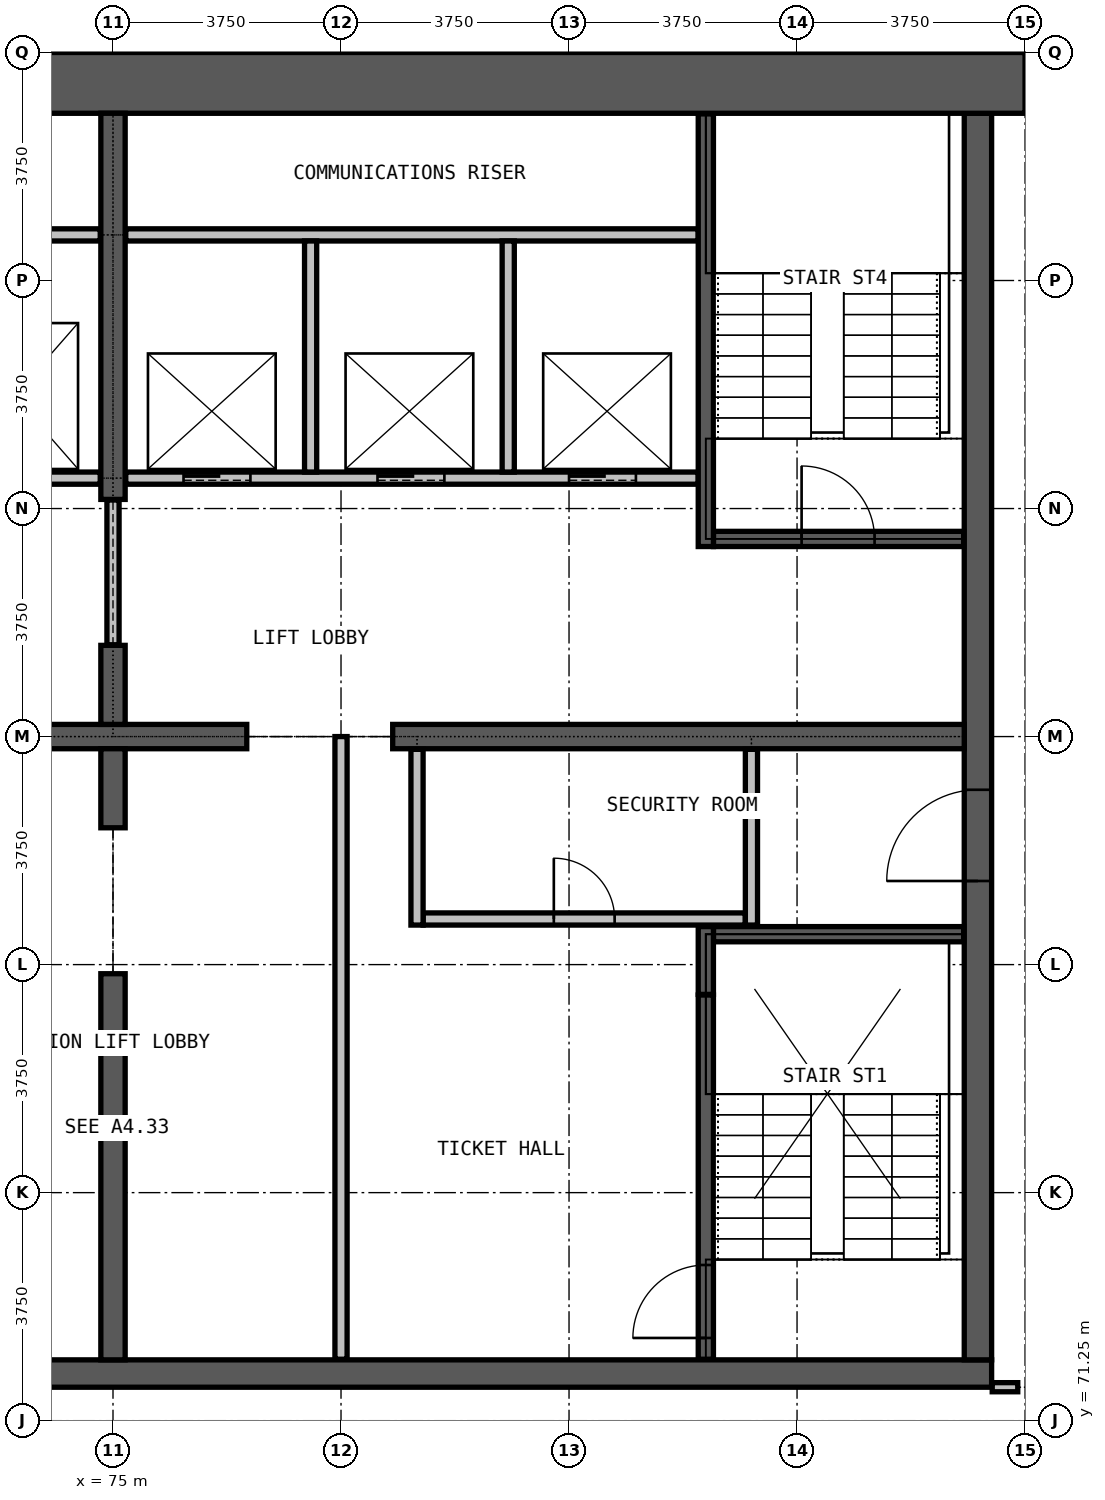
"""IFC4 building model, lengths in metres.
Left out: names, types, materials, properties, quantities, classifications, styles, units other than length and angle.
Written with IfcOpenShell. Run it as: python <this file> out.ifc"""

import sys

from ifc_helpers import new_model, si_unit, direction, frame, frame_2d, origin, place, context, subcontext, project, spatial, rectangle, extrude, element, fill, save


model = new_model("IFC4")
c1 = context("Model", 3, precision=1e-05, world=origin(), true_north=direction((0.0, 1.0)))
c2 = subcontext(c1, "Body", "Model", "MODEL_VIEW")
j1 = project(units=[si_unit("LENGTHUNIT", "METRE"), si_unit("PLANEANGLEUNIT", "RADIAN")], contexts=[c1])
p1 = place(None, origin())
s1 = spatial("IfcSite", under=j1, at=p1, CompositionType="ELEMENT")
p2 = place(p1, origin())
s2 = spatial("IfcBuilding", under=s1, at=p2, CompositionType="ELEMENT")
p3 = place(p2, frame((0.0, 0.0, 287.7)))
s3 = spatial("IfcBuildingStorey", under=s2, at=p3, CompositionType="ELEMENT", Elevation=287.7)
p4 = place(p3, frame((60.55, 72.025, 0.0), z_axis=(0.0, 0.0, 1.0), x_axis=(1.0, 0.0, 0.0)))
e1 = element("IfcWall", 1, at=p4, inside=s3, PredefinedType="SHEAR", context=c2, shape_type="SweptSolid", body=[
    extrude(rectangle(XDim=28.9, YDim=0.45, at=frame_2d((14.45, 0.0))), origin(), (0.0, 0.0, 1.0), 5.0),
])
p5 = place(p4, frame((10.325, 0.0, 0.0)))
e2 = element("IfcOpeningElement", 2, at=p5, cuts=e1, PredefinedType="OPENING", context=c2, shape_type="SweptSolid", body=[
    extrude(rectangle(XDim=1.5, YDim=2.2, at=frame_2d((0.75, 1.1))), frame((0.0, 0.235, 0.0), z_axis=(0.0, -1.0, 0.0), x_axis=(1.0, 0.0, 0.0)), (0.0, 0.0, 1.0), 0.47),
])
p6 = place(p3, frame((89.225, 72.25, 0.0), z_axis=(0.0, 0.0, 1.0), x_axis=(0.0, 1.0, 0.0)))
e3 = element("IfcWall", 3, at=p6, inside=s3, PredefinedType="SHEAR", context=c2, shape_type="SweptSolid", body=[
    extrude(rectangle(XDim=20.5, YDim=0.45, at=frame_2d((10.25, 0.0))), origin(), (0.0, 0.0, 1.0), 5.0),
])
p7 = place(p6, frame((7.875, 0.0, 0.0)))
e4 = element("IfcOpeningElement", 4, at=p7, cuts=e3, PredefinedType="OPENING", context=c2, shape_type="SweptSolid", body=[
    extrude(rectangle(XDim=1.5, YDim=2.2, at=frame_2d((0.75, 1.1))), frame((0.0, 0.235, 0.0), z_axis=(0.0, -1.0, 0.0), x_axis=(1.0, 0.0, 0.0)), (0.0, 0.0, 1.0), 0.47),
])
p8 = place(p3, frame((90.0, 93.25, 0.0), z_axis=(0.0, 0.0, 1.0), x_axis=(-1.0, 0.0, 0.0)))
e5 = element("IfcWall", 5, at=p8, inside=s3, PredefinedType="SHEAR", context=c2, shape_type="SweptSolid", body=[
    extrude(rectangle(XDim=30.0, YDim=1.0, at=frame_2d((15.0, 0.0))), origin(), (0.0, 0.0, 1.0), 5.0),
])
p9 = place(p3, frame((72.8, 82.5, 0.0), z_axis=(0.0, 0.0, 1.0), x_axis=(1.0, 0.0, 0.0)))
e6 = element("IfcWall", 6, at=p9, inside=s3, PredefinedType="SHEAR", context=c2, shape_type="SweptSolid", body=[
    extrude(rectangle(XDim=4.4, YDim=0.4, at=frame_2d((2.2, 0.0))), origin(), (0.0, 0.0, 1.0), 5.0),
])
p10 = place(p3, frame((79.6, 82.5, 0.0), z_axis=(0.0, 0.0, 1.0), x_axis=(1.0, 0.0, 0.0)))
e7 = element("IfcWall", 7, at=p10, inside=s3, PredefinedType="SHEAR", context=c2, shape_type="SweptSolid", body=[
    extrude(rectangle(XDim=9.4, YDim=0.4, at=frame_2d((4.7, 0.0))), origin(), (0.0, 0.0, 1.0), 5.0),
])
p11 = place(p3, frame((75.0, 72.25, 0.0), z_axis=(0.0, 0.0, 1.0), x_axis=(0.0, 1.0, 0.0)))
e8 = element("IfcWall", 8, at=p11, inside=s3, PredefinedType="SHEAR", context=c2, shape_type="SweptSolid", body=[
    extrude(rectangle(XDim=6.35, YDim=0.4, at=frame_2d((3.175, 0.0))), origin(), (0.0, 0.0, 1.0), 5.0),
])
for number, where, z_axis, x_axis in (
    (9, (75.0, 81.0, 0.0), (0.0, 0.0, 1.0), (0.0, 1.0, 0.0)),
    (10, (75.0, 82.7, 0.0), (0.0, 0.0, 1.0), (0.0, 1.0, 0.0)),
):
    element("IfcWall", number, at=place(p3, frame(where, z_axis=z_axis, x_axis=x_axis)), inside=s3, PredefinedType="SHEAR", context=c2, shape_type="SweptSolid", body=[
        extrude(rectangle(XDim=1.3, YDim=0.4, at=frame_2d((0.65, 0.0))), origin(), (0.0, 0.0, 1.0), 5.0),
    ])
p12 = place(p3, frame((75.0, 86.4, 0.0), z_axis=(0.0, 0.0, 1.0), x_axis=(0.0, 1.0, 0.0)))
e11 = element("IfcWall", 11, at=p12, inside=s3, PredefinedType="SHEAR", context=c2, shape_type="SweptSolid", body=[
    extrude(rectangle(XDim=6.35, YDim=0.4, at=frame_2d((3.175, 0.0))), origin(), (0.0, 0.0, 1.0), 5.0),
])
p13 = place(p3, frame((80.1, 79.5, 0.0), z_axis=(0.0, 0.0, 1.0), x_axis=(1.0, 0.0, 0.0)))
e12 = element("IfcWall", 12, at=p13, inside=s3, PredefinedType="PARTITIONING", context=c2, shape_type="SweptSolid", body=[
    extrude(rectangle(XDim=5.3, YDim=0.2, at=frame_2d((2.65, 0.0))), origin(), (0.0, 0.0, 1.0), 4.65),
])
p14 = place(p13, frame((2.15, 0.0, 0.0)))
e13 = element("IfcOpeningElement", 13, at=p14, cuts=e12, PredefinedType="OPENING", context=c2, shape_type="SweptSolid", body=[
    extrude(rectangle(XDim=1.0, YDim=2.2, at=frame_2d((0.5, 1.1))), frame((0.0, 0.11, 0.0), z_axis=(0.0, -1.0, 0.0), x_axis=(1.0, 0.0, 0.0)), (0.0, 0.0, 1.0), 0.22),
])
p15 = place(p3, frame((75.0, 84.01, 0.0), z_axis=(0.0, 0.0, 1.0), x_axis=(0.0, 1.0, 0.0)))
e14 = element("IfcWall", 14, at=p15, inside=s3, PredefinedType="PARTITIONING", context=c2, shape_type="SweptSolid", body=[
    extrude(rectangle(XDim=2.38, YDim=0.2, at=frame_2d((1.19, 0.0))), origin(), (0.0, 0.0, 1.0), 2.4),
])
p16 = place(p3, frame((78.75, 72.26, 0.0), z_axis=(0.0, 0.0, 1.0), x_axis=(0.0, 1.0, 0.0)))
e15 = element("IfcWall", 15, at=p16, inside=s3, PredefinedType="PARTITIONING", context=c2, shape_type="SweptSolid", body=[
    extrude(rectangle(XDim=10.24, YDim=0.2, at=frame_2d((5.12, 0.0))), origin(), (0.0, 0.0, 1.0), 4.65),
])
for number, where, z_axis, x_axis in (
    (16, (80.0, 79.4, 0.0), (0.0, 0.0, 1.0), (0.0, 1.0, 0.0)),
    (17, (85.5, 79.4, 0.0), (0.0, 0.0, 1.0), (0.0, 1.0, 0.0)),
):
    element("IfcWall", number, at=place(p3, frame(where, z_axis=z_axis, x_axis=x_axis)), inside=s3, PredefinedType="PARTITIONING", context=c2, shape_type="SweptSolid", body=[
        extrude(rectangle(XDim=2.89, YDim=0.2, at=frame_2d((1.445, 0.0))), origin(), (0.0, 0.0, 1.0), 4.65),
    ])
p17 = place(p3, frame((89.46, 71.8, 0.0), z_axis=(0.0, 0.0, 1.0), x_axis=(1.0, 0.0, 0.0)))
e18 = element("IfcWall", 18, at=p17, inside=s3, PredefinedType="PARTITIONING", context=c2, shape_type="SweptSolid", body=[
    extrude(rectangle(XDim=0.42, YDim=0.15, at=frame_2d((0.21, 0.0))), origin(), (0.0, 0.0, 1.0), 4.65),
])
p18 = place(p3, frame((65.375, 86.75, 0.0), z_axis=(0.0, 0.0, 1.0), x_axis=(1.0, 0.0, 0.0)))
e19 = element("IfcWall", 19, at=p18, inside=s3, PredefinedType="PARTITIONING", context=c2, shape_type="SweptSolid", body=[
    extrude(rectangle(XDim=9.415, YDim=0.2, at=frame_2d((4.708, 0.0))), origin(), (0.0, 0.0, 1.0), 4.65),
])
p19 = place(p18, frame((1.0, 0.0, 0.0)))
e20 = element("IfcOpeningElement", 20, at=p19, cuts=e19, PredefinedType="OPENING", context=c2, shape_type="SweptSolid", body=[
    extrude(rectangle(XDim=1.1, YDim=2.2, at=frame_2d((0.55, 1.1))), frame((0.0, 0.11, 0.0), z_axis=(0.0, -1.0, 0.0), x_axis=(1.0, 0.0, 0.0)), (0.0, 0.0, 1.0), 0.22),
])
p20 = place(p18, frame((4.175, 0.0, 0.0)))
e21 = element("IfcOpeningElement", 21, at=p20, cuts=e19, PredefinedType="OPENING", context=c2, shape_type="SweptSolid", body=[
    extrude(rectangle(XDim=1.1, YDim=2.2, at=frame_2d((0.55, 1.1))), frame((0.0, 0.11, 0.0), z_axis=(0.0, -1.0, 0.0), x_axis=(1.0, 0.0, 0.0)), (0.0, 0.0, 1.0), 0.22),
])
p21 = place(p18, frame((7.325, 0.0, 0.0)))
e22 = element("IfcOpeningElement", 22, at=p21, cuts=e19, PredefinedType="OPENING", context=c2, shape_type="SweptSolid", body=[
    extrude(rectangle(XDim=1.1, YDim=2.2, at=frame_2d((0.55, 1.1))), frame((0.0, 0.11, 0.0), z_axis=(0.0, -1.0, 0.0), x_axis=(1.0, 0.0, 0.0)), (0.0, 0.0, 1.0), 0.22),
])
p22 = place(p3, frame((75.21, 86.75, 0.0), z_axis=(0.0, 0.0, 1.0), x_axis=(1.0, 0.0, 0.0)))
e23 = element("IfcWall", 23, at=p22, inside=s3, PredefinedType="PARTITIONING", context=c2, shape_type="SweptSolid", body=[
    extrude(rectangle(XDim=9.415, YDim=0.2, at=frame_2d((4.708, 0.0))), origin(), (0.0, 0.0, 1.0), 4.65),
])
p23 = place(p22, frame((0.95, 0.0, 0.0)))
e24 = element("IfcOpeningElement", 24, at=p23, cuts=e23, PredefinedType="OPENING", context=c2, shape_type="SweptSolid", body=[
    extrude(rectangle(XDim=1.1, YDim=2.2, at=frame_2d((0.55, 1.1))), frame((0.0, 0.11, 0.0), z_axis=(0.0, -1.0, 0.0), x_axis=(1.0, 0.0, 0.0)), (0.0, 0.0, 1.0), 0.22),
])
p24 = place(p22, frame((4.14, 0.0, 0.0)))
e25 = element("IfcOpeningElement", 25, at=p24, cuts=e23, PredefinedType="OPENING", context=c2, shape_type="SweptSolid", body=[
    extrude(rectangle(XDim=1.1, YDim=2.2, at=frame_2d((0.55, 1.1))), frame((0.0, 0.11, 0.0), z_axis=(0.0, -1.0, 0.0), x_axis=(1.0, 0.0, 0.0)), (0.0, 0.0, 1.0), 0.22),
])
p25 = place(p22, frame((7.29, 0.0, 0.0)))
e26 = element("IfcOpeningElement", 26, at=p25, cuts=e23, PredefinedType="OPENING", context=c2, shape_type="SweptSolid", body=[
    extrude(rectangle(XDim=1.1, YDim=2.2, at=frame_2d((0.55, 1.1))), frame((0.0, 0.11, 0.0), z_axis=(0.0, -1.0, 0.0), x_axis=(1.0, 0.0, 0.0)), (0.0, 0.0, 1.0), 0.22),
])
for number, where, z_axis, x_axis in (
    (27, (65.375, 90.75, 0.0), (0.0, 0.0, 1.0), (1.0, 0.0, 0.0)),
    (28, (75.21, 90.75, 0.0), (0.0, 0.0, 1.0), (1.0, 0.0, 0.0)),
):
    element("IfcWall", number, at=place(p3, frame(where, z_axis=z_axis, x_axis=x_axis)), inside=s3, PredefinedType="PARTITIONING", context=c2, shape_type="SweptSolid", body=[
        extrude(rectangle(XDim=9.415, YDim=0.2, at=frame_2d((4.708, 0.0))), origin(), (0.0, 0.0, 1.0), 4.65),
    ])
for number, where, z_axis, x_axis in (
    (29, (78.25, 86.85, 0.0), (0.0, 0.0, 1.0), (0.0, 1.0, 0.0)),
    (30, (81.5, 86.85, 0.0), (0.0, 0.0, 1.0), (0.0, 1.0, 0.0)),
):
    element("IfcWall", number, at=place(p3, frame(where, z_axis=z_axis, x_axis=x_axis)), inside=s3, PredefinedType="PARTITIONING", context=c2, shape_type="SweptSolid", body=[
        extrude(rectangle(XDim=3.8, YDim=0.2, at=frame_2d((1.9, 0.0))), origin(), (0.0, 0.0, 1.0), 4.65),
    ])
p26 = place(p3, frame((84.875, 79.25, 0.0), z_axis=(0.0, 0.0, 1.0), x_axis=(1.0, 0.0, 0.0)))
e31 = element("IfcWall", 31, at=p26, inside=s3, PredefinedType="PARTITIONING", context=c2, shape_type="SweptSolid", body=[
    extrude(rectangle(XDim=4.115, YDim=0.25, at=frame_2d((2.058, 0.0))), origin(), (0.0, 0.0, 1.0), 4.65),
])
p27 = place(p3, frame((84.875, 85.75, 0.0), z_axis=(0.0, 0.0, 1.0), x_axis=(1.0, 0.0, 0.0)))
e32 = element("IfcWall", 32, at=p27, inside=s3, PredefinedType="PARTITIONING", context=c2, shape_type="SweptSolid", body=[
    extrude(rectangle(XDim=4.115, YDim=0.25, at=frame_2d((2.058, 0.0))), origin(), (0.0, 0.0, 1.0), 4.65),
])
p28 = place(p27, frame((1.45, 0.0, 0.0)))
e33 = element("IfcOpeningElement", 33, at=p28, cuts=e32, PredefinedType="OPENING", context=c2, shape_type="SweptSolid", body=[
    extrude(rectangle(XDim=1.2, YDim=2.2, at=frame_2d((0.6, 1.1))), frame((0.0, 0.135, 0.0), z_axis=(0.0, -1.0, 0.0), x_axis=(1.0, 0.0, 0.0)), (0.0, 0.0, 1.0), 0.27),
])
p29 = place(p3, frame((84.75, 72.26, 0.0), z_axis=(0.0, 0.0, 1.0), x_axis=(0.0, 1.0, 0.0)))
e34 = element("IfcWall", 34, at=p29, inside=s3, PredefinedType="PARTITIONING", context=c2, shape_type="SweptSolid", body=[
    extrude(rectangle(XDim=5.99, YDim=0.25, at=frame_2d((2.995, 0.0))), origin(), (0.0, 0.0, 1.0), 4.65),
])
p30 = place(p29, frame((0.35, 0.0, 0.0)))
e35 = element("IfcOpeningElement", 35, at=p30, cuts=e34, PredefinedType="OPENING", context=c2, shape_type="SweptSolid", body=[
    extrude(rectangle(XDim=1.2, YDim=2.2, at=frame_2d((0.6, 1.1))), frame((0.0, 0.135, 0.0), z_axis=(0.0, -1.0, 0.0), x_axis=(1.0, 0.0, 0.0)), (0.0, 0.0, 1.0), 0.27),
])
p31 = place(p3, frame((84.75, 78.26, 0.0), z_axis=(0.0, 0.0, 1.0), x_axis=(0.0, 1.0, 0.0)))
e36 = element("IfcWall", 36, at=p31, inside=s3, PredefinedType="PARTITIONING", context=c2, shape_type="SweptSolid", body=[
    extrude(rectangle(XDim=1.115, YDim=0.25, at=frame_2d((0.558, 0.0))), origin(), (0.0, 0.0, 1.0), 4.65),
])
p32 = place(p3, frame((84.75, 85.625, 0.0), z_axis=(0.0, 0.0, 1.0), x_axis=(0.0, 1.0, 0.0)))
e37 = element("IfcWall", 37, at=p32, inside=s3, PredefinedType="PARTITIONING", context=c2, shape_type="SweptSolid", body=[
    extrude(rectangle(XDim=7.115, YDim=0.25, at=frame_2d((3.558, 0.0))), origin(), (0.0, 0.0, 1.0), 4.65),
])
p33 = place(p23, origin())
e38 = element("IfcDoor", 38, at=p33, inside=s3, OperationType="DOUBLE_DOOR_SLIDING", PredefinedType="DOOR", context=c2, shape_type="SweptSolid", body=[
    extrude(rectangle(XDim=1.1, YDim=2.2, at=frame_2d((0.55, 1.1))), frame((0.0, 0.025, 0.0), z_axis=(0.0, -1.0, 0.0), x_axis=(1.0, 0.0, 0.0)), (0.0, 0.0, 1.0), 0.05),
])
fill(e24, e38)
p34 = place(p24, origin())
e39 = element("IfcDoor", 39, at=p34, inside=s3, OperationType="DOUBLE_DOOR_SLIDING", PredefinedType="DOOR", context=c2, shape_type="SweptSolid", body=[
    extrude(rectangle(XDim=1.1, YDim=2.2, at=frame_2d((0.55, 1.1))), frame((0.0, 0.025, 0.0), z_axis=(0.0, -1.0, 0.0), x_axis=(1.0, 0.0, 0.0)), (0.0, 0.0, 1.0), 0.05),
])
fill(e25, e39)
p35 = place(p25, origin())
e40 = element("IfcDoor", 40, at=p35, inside=s3, OperationType="DOUBLE_DOOR_SLIDING", PredefinedType="DOOR", context=c2, shape_type="SweptSolid", body=[
    extrude(rectangle(XDim=1.1, YDim=2.2, at=frame_2d((0.55, 1.1))), frame((0.0, 0.025, 0.0), z_axis=(0.0, -1.0, 0.0), x_axis=(1.0, 0.0, 0.0)), (0.0, 0.0, 1.0), 0.05),
])
fill(e26, e40)
p36 = place(p28, origin())
e41 = element("IfcDoor", 41, at=p36, inside=s3, OperationType="SINGLE_SWING_RIGHT", PredefinedType="DOOR", context=c2, shape_type="SweptSolid", body=[
    extrude(rectangle(XDim=1.2, YDim=2.2, at=frame_2d((0.6, 1.1))), frame((0.0, 0.025, 0.0), z_axis=(0.0, -1.0, 0.0), x_axis=(1.0, 0.0, 0.0)), (0.0, 0.0, 1.0), 0.05),
])
fill(e33, e41)
p37 = place(p30, origin())
e42 = element("IfcDoor", 42, at=p37, inside=s3, OperationType="SINGLE_SWING_LEFT", PredefinedType="DOOR", context=c2, shape_type="SweptSolid", body=[
    extrude(rectangle(XDim=1.2, YDim=2.2, at=frame_2d((0.6, 1.1))), frame((0.0, 0.025, 0.0), z_axis=(0.0, -1.0, 0.0), x_axis=(1.0, 0.0, 0.0)), (0.0, 0.0, 1.0), 0.05),
])
fill(e35, e42)
p38 = place(p7, origin())
e43 = element("IfcDoor", 43, at=p38, inside=s3, OperationType="DOUBLE_DOOR_SINGLE_SWING", PredefinedType="DOOR", context=c2, shape_type="SweptSolid", body=[
    extrude(rectangle(XDim=1.5, YDim=2.2, at=frame_2d((0.75, 1.1))), frame((0.0, 0.025, 0.0), z_axis=(0.0, -1.0, 0.0), x_axis=(1.0, 0.0, 0.0)), (0.0, 0.0, 1.0), 0.05),
])
fill(e4, e43)
p39 = place(p14, origin())
e44 = element("IfcDoor", 44, at=p39, inside=s3, OperationType="SINGLE_SWING_RIGHT", PredefinedType="DOOR", context=c2, shape_type="SweptSolid", body=[
    extrude(rectangle(XDim=1.0, YDim=2.2, at=frame_2d((0.5, 1.1))), frame((0.0, 0.025, 0.0), z_axis=(0.0, -1.0, 0.0), x_axis=(1.0, 0.0, 0.0)), (0.0, 0.0, 1.0), 0.05),
])
fill(e13, e44)
save(model, sys.argv[1])
